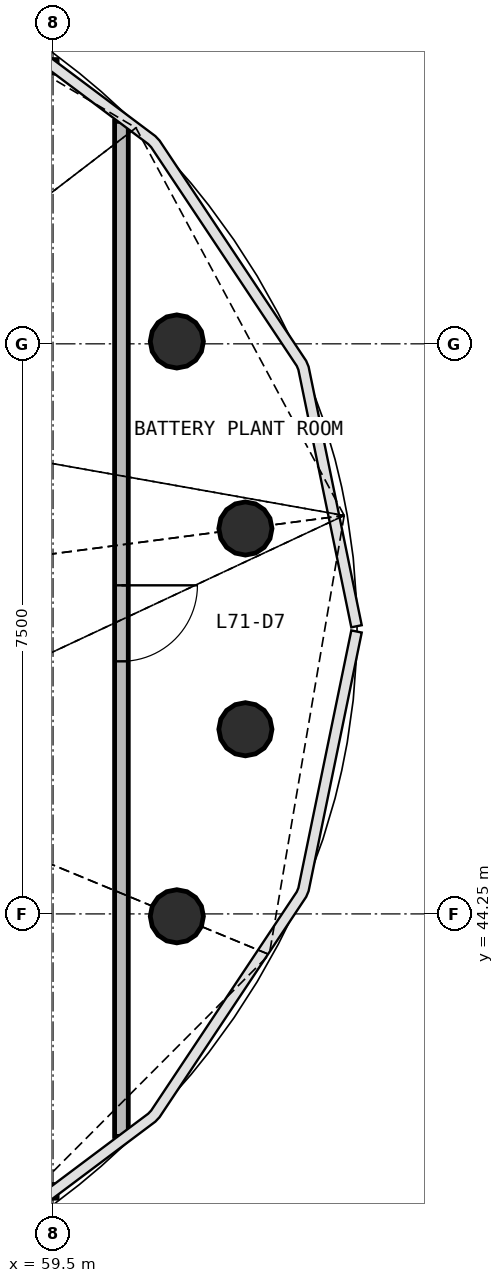
"""IFC4 building model, lengths in metres.
Left out: names, types, materials, properties, quantities, classifications, styles, units other than length and angle.
Written with IfcOpenShell. Run it as: python <this file> out.ifc"""

import sys

from ifc_helpers import new_model, si_unit, direction, frame, frame_2d, origin, origin_2d, place, context, subcontext, project, spatial, rectangle, circle, extrude, source, transform, mapped, element, fill, save


model = new_model("IFC4")
c1 = context("Model", 3, precision=1e-05, world=origin(), true_north=direction((0.0, 1.0)))
c2 = subcontext(c1, "Body", "Model", "MODEL_VIEW")
j1 = project(units=[si_unit("LENGTHUNIT", "METRE"), si_unit("PLANEANGLEUNIT", "RADIAN")], contexts=[c1])
p1 = place(None, origin())
s1 = spatial("IfcSite", under=j1, at=p1, CompositionType="ELEMENT")
p2 = place(p1, origin())
s2 = spatial("IfcBuilding", under=s1, at=p2, CompositionType="ELEMENT")
p3 = place(p2, frame((0.0, 0.0, 287.1)))
s3 = spatial("IfcBuildingStorey", under=s2, at=p3, CompositionType="ELEMENT", Elevation=287.1)
m1 = source(origin(), c2, "Body", "SweptSolid", [
    extrude(circle(Radius=0.35, at=origin_2d()), origin(), (0.0, 0.0, 1.0), 3.67),
])
p4 = place(p3, frame((62.031, 49.321, 0.174), z_axis=(-0.485581289046, -0.063923783394, 0.871851226784), x_axis=(0.130517750651, -0.991445972691, 0.0)))
e1 = element("IfcColumn", 1, at=p4, inside=s3, PredefinedType="COLUMN", context=c2, shape_type="MappedRepresentation", body=[
    mapped(m1, transform((0.0, 0.0, 0.0), scale=1.0)),
])
m2 = source(origin(), c2, "Body", "SweptSolid", [
    extrude(circle(Radius=0.35, at=origin_2d()), origin(), (0.0, 0.0, 1.0), 3.721),
])
p5 = place(p3, frame((61.129, 51.781, 0.181), z_axis=(-0.471368199064, -0.19520050003, 0.860063245174), x_axis=(0.38260546681, -0.923911823047, 0.0)))
e2 = element("IfcColumn", 2, at=p5, inside=s3, PredefinedType="COLUMN", context=c2, shape_type="MappedRepresentation", body=[
    mapped(m2, transform((0.0, 0.0, 0.0), scale=1.0)),
])
m3 = source(origin(), c2, "Body", "SweptSolid", [
    extrude(circle(Radius=0.35, at=origin_2d()), origin(), (0.0, 0.0, 1.0), 3.481),
])
p6 = place(p3, frame((61.129, 44.219, 0.141), z_axis=(-0.363634980693, 0.150573636171, 0.919291673467), x_axis=(-0.382577370091, -0.923923457811, 0.0)))
e3 = element("IfcColumn", 3, at=p6, inside=s3, PredefinedType="COLUMN", context=c2, shape_type="MappedRepresentation", body=[
    mapped(m3, transform((0.0, 0.0, 0.0), scale=1.0)),
])
m4 = source(origin(), c2, "Body", "SweptSolid", [
    extrude(circle(Radius=0.35, at=origin_2d()), origin(), (0.0, 0.0, 1.0), 3.564),
])
p7 = place(p3, frame((62.031, 46.679, 0.157), z_axis=(-0.436555493474, 0.057472157387, 0.897839769805), x_axis=(-0.130522924776, -0.991445291535, 0.0)))
e4 = element("IfcColumn", 4, at=p7, inside=s3, PredefinedType="COLUMN", context=c2, shape_type="MappedRepresentation", body=[
    mapped(m4, transform((0.0, 0.0, 0.0), scale=1.0)),
])
p8 = place(p3, frame((60.4, 54.677, 0.0), z_axis=(0.0, 0.0, 1.0), x_axis=(0.0, -1.0, 0.0)))
e5 = element("IfcWall", 5, at=p8, inside=s3, PredefinedType="PARTITIONING", context=c2, shape_type="SweptSolid", body=[
    extrude(rectangle(XDim=13.354, YDim=0.18, at=frame_2d((6.677, 0.0))), origin(), (0.0, 0.0, 1.0), 2.62),
])
p9 = place(p8, frame((6.104, 0.0, 0.0)))
e6 = element("IfcOpeningElement", 6, at=p9, cuts=e5, PredefinedType="OPENING", context=c2, shape_type="SweptSolid", body=[
    extrude(rectangle(XDim=1.0, YDim=2.1, at=frame_2d((0.5, 1.05))), frame((0.0, 0.1, 0.0), z_axis=(0.0, -1.0, 0.0), x_axis=(1.0, 0.0, 0.0)), (0.0, 0.0, 1.0), 0.2),
])
for number, where, z_axis, x_axis in (
    (7, (57.871, 40.6, 0.0), (0.0, 0.0, 1.0), (1.0, 0.0, 0.0)),
    (8, (59.554, 55.4, 0.0), (0.0, 0.0, 1.0), (-1.0, 0.0, 0.0)),
):
    element("IfcWall", number, at=place(p3, frame(where, z_axis=z_axis, x_axis=x_axis)), inside=s3, PredefinedType="PARTITIONING", context=c2, shape_type="SweptSolid", body=[
        extrude(rectangle(XDim=1.682, YDim=0.18, at=frame_2d((0.841, 0.0))), origin(), (0.0, 0.0, 1.0), 2.62),
    ])
m5 = source(origin(), c2, "Body", "SweptSolid", [
    extrude(rectangle(XDim=1.0, YDim=2.1, at=frame_2d((0.5, 1.05))), frame((0.0, 0.025, 0.0), z_axis=(0.0, -1.0, 0.0), x_axis=(1.0, 0.0, 0.0)), (0.0, 0.0, 1.0), 0.05),
])
p10 = place(p9, origin())
e9 = element("IfcDoor", 9, at=p10, inside=s3, OperationType="SINGLE_SWING_LEFT", PredefinedType="DOOR", context=c2, shape_type="MappedRepresentation", body=[
    mapped(m5, transform((0.0, 0.0, 0.0), scale=1.0)),
])
fill(e6, e9)
save(model, sys.argv[1])
